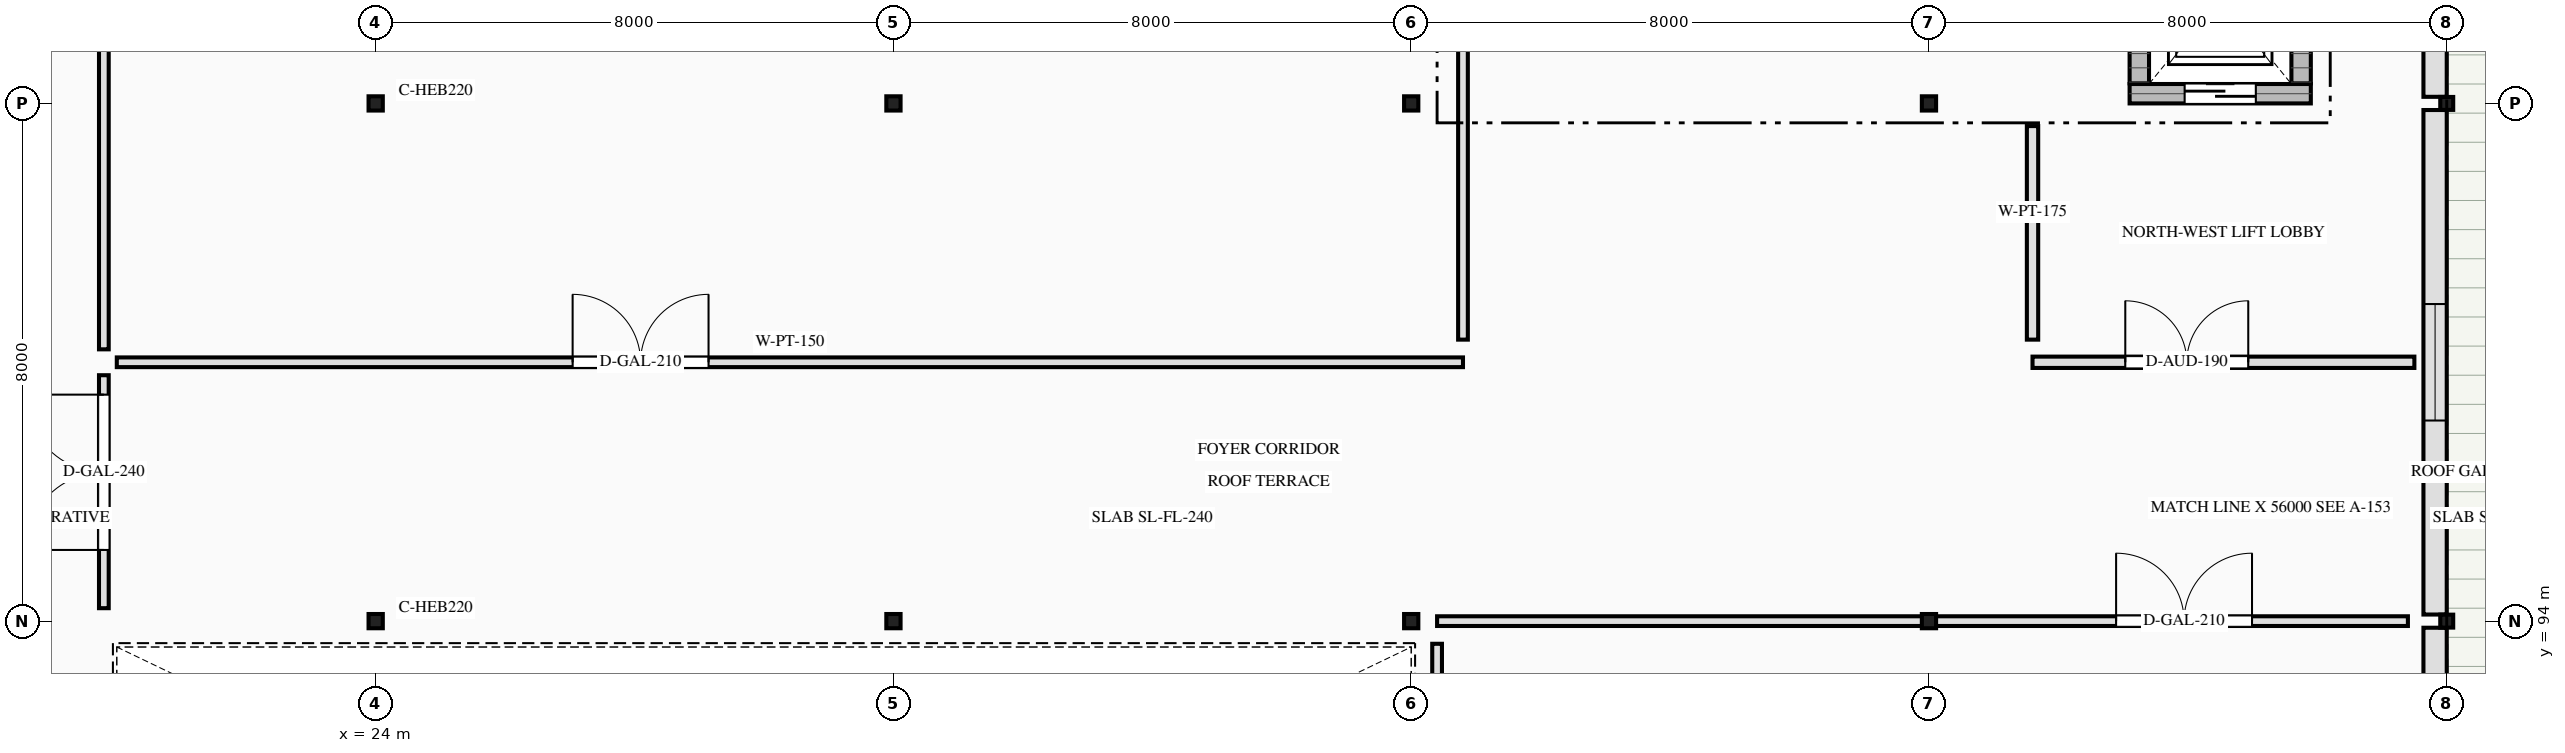
"""IFC4 building model, lengths in metres.
Left out: names, types, materials, properties, quantities, classifications, styles, units other than length and angle.
Written with IfcOpenShell. Run it as: python <this file> out.ifc"""

import sys

from ifc_helpers import new_model, si_unit, direction, frame, frame_2d, origin, origin_2d, place, context, subcontext, project, spatial, rectangle, i_section, extrude, element, fill, save


model = new_model("IFC4")
c1 = context("Model", 3, precision=1e-05, world=origin(), true_north=direction((0.0, 1.0)))
c2 = subcontext(c1, "Body", "Model", "MODEL_VIEW")
j1 = project(units=[si_unit("LENGTHUNIT", "METRE"), si_unit("PLANEANGLEUNIT", "RADIAN")], contexts=[c1])
p1 = place(None, origin())
s1 = spatial("IfcSite", under=j1, at=p1, CompositionType="ELEMENT")
p2 = place(p1, origin())
s2 = spatial("IfcBuilding", under=s1, at=p2, CompositionType="ELEMENT")
p3 = place(p2, frame((0.0, 0.0, 21.8)))
s3 = spatial("IfcBuildingStorey", under=s2, at=p3, CompositionType="ELEMENT", Elevation=21.8)
p4 = place(p3, frame((51.1, 102.15, 0.0), z_axis=(0.0, 0.0, 1.0), x_axis=(1.0, 0.0, 0.0)))
e1 = element("IfcWall", 1, at=p4, inside=s3, PredefinedType="SHEAR", context=c2, shape_type="SweptSolid", body=[
    extrude(rectangle(XDim=2.8, YDim=0.3, at=frame_2d((1.4, 0.0))), origin(), (0.0, 0.0, 1.0), 4.2),
])
p5 = place(p4, frame((0.85, 0.0, 0.0)))
e2 = element("IfcOpeningElement", 2, at=p5, cuts=e1, PredefinedType="OPENING", context=c2, shape_type="SweptSolid", body=[
    extrude(rectangle(XDim=1.1, YDim=2.15, at=frame_2d((0.55, 1.075))), frame((0.0, 0.16, 0.0), z_axis=(0.0, -1.0, 0.0), x_axis=(1.0, 0.0, 0.0)), (0.0, 0.0, 1.0), 0.32),
])
for number, where, z_axis, x_axis in (
    (3, (51.25, 102.31, 0.0), (0.0, 0.0, 1.0), (0.0, 1.0, 0.0)),
    (4, (53.75, 102.31, 0.0), (0.0, 0.0, 1.0), (0.0, 1.0, 0.0)),
):
    element("IfcWall", number, at=place(p3, frame(where, z_axis=z_axis, x_axis=x_axis)), inside=s3, PredefinedType="SHEAR", context=c2, shape_type="SweptSolid", body=[
        extrude(rectangle(XDim=2.68, YDim=0.3, at=frame_2d((1.34, 0.0))), origin(), (0.0, 0.0, 1.0), 4.2),
    ])
for number, where, z_axis, x_axis in (
    (5, (24.0, 94.0, 0.0), (0.0, 0.0, 1.0), (1.0, 0.0, 0.0)),
    (6, (24.0, 102.0, 0.0), (0.0, 0.0, 1.0), (1.0, 0.0, 0.0)),
    (7, (32.0, 94.0, 0.0), (0.0, 0.0, 1.0), (1.0, 0.0, 0.0)),
    (8, (32.0, 102.0, 0.0), (0.0, 0.0, 1.0), (1.0, 0.0, 0.0)),
    (9, (40.0, 94.0, 0.0), (0.0, 0.0, 1.0), (1.0, 0.0, 0.0)),
    (10, (40.0, 102.0, 0.0), (0.0, 0.0, 1.0), (1.0, 0.0, 0.0)),
    (11, (48.0, 94.0, 0.0), (0.0, 0.0, 1.0), (1.0, 0.0, 0.0)),
    (12, (48.0, 102.0, 0.0), (0.0, 0.0, 1.0), (1.0, 0.0, 0.0)),
):
    element("IfcColumn", number, at=place(p3, frame(where, z_axis=z_axis, x_axis=x_axis)), inside=s3, PredefinedType="COLUMN", context=c2, shape_type="SweptSolid", body=[
        extrude(i_section(OverallWidth=0.22, OverallDepth=0.22, WebThickness=0.01, FlangeThickness=0.016, FilletRadius=0.018, at=origin_2d()), origin(), (0.0, 0.0, 1.0), 4.2),
    ])
for number, where, z_axis, x_axis in (
    (13, (56.0, 94.0, 0.0), (0.0, 0.0, 1.0), (1.0, 0.0, 0.0)),
    (14, (56.0, 102.0, 0.0), (0.0, 0.0, 1.0), (1.0, 0.0, 0.0)),
):
    element("IfcColumn", number, at=place(p3, frame(where, z_axis=z_axis, x_axis=x_axis)), inside=s3, PredefinedType="COLUMN", context=c2, shape_type="SweptSolid", body=[
        extrude(i_section(OverallWidth=0.2, OverallDepth=0.2, WebThickness=0.009, FlangeThickness=0.015, FilletRadius=0.018, at=origin_2d()), origin(), (0.0, 0.0, 1.0), 4.2),
    ])
p6 = place(p3, frame((55.82, 93.898, 0.0), z_axis=(0.0, 0.0, 1.0), x_axis=(0.0, -1.0, 0.0)))
e15 = element("IfcWall", 15, at=p6, inside=s3, PredefinedType="ELEMENTEDWALL", context=c2, shape_type="SweptSolid", body=[
    extrude(rectangle(XDim=7.796, YDim=0.36, at=frame_2d((3.898, 0.0))), origin(), (0.0, 0.0, 1.0), 3.92),
])
p7 = place(p6, frame((2.923, 0.0, 0.0)))
e16 = element("IfcOpeningElement", 16, at=p7, cuts=e15, PredefinedType="OPENING", context=c2, shape_type="SweptSolid", body=[
    extrude(rectangle(XDim=1.95, YDim=2.35, at=frame_2d((0.975, 1.175))), frame((0.0, 0.19, 0.0), z_axis=(0.0, -1.0, 0.0), x_axis=(1.0, 0.0, 0.0)), (0.0, 0.0, 1.0), 0.38),
])
p8 = place(p3, frame((55.82, 101.898, 0.0), z_axis=(0.0, 0.0, 1.0), x_axis=(0.0, -1.0, 0.0)))
e17 = element("IfcWall", 17, at=p8, inside=s3, PredefinedType="ELEMENTEDWALL", context=c2, shape_type="SweptSolid", body=[
    extrude(rectangle(XDim=7.796, YDim=0.36, at=frame_2d((3.898, 0.0))), origin(), (0.0, 0.0, 1.0), 3.92),
])
p9 = place(p8, frame((2.998, 0.0, 0.85)))
e18 = element("IfcOpeningElement", 18, at=p9, cuts=e17, PredefinedType="OPENING", context=c2, shape_type="SweptSolid", body=[
    extrude(rectangle(XDim=1.8, YDim=2.1, at=frame_2d((0.9, 1.05))), frame((0.0, 0.19, 0.0), z_axis=(0.0, -1.0, 0.0), x_axis=(1.0, 0.0, 0.0)), (0.0, 0.0, 1.0), 0.38),
])
p10 = place(p3, frame((55.82, 107.898, 0.0), z_axis=(0.0, 0.0, 1.0), x_axis=(0.0, -1.0, 0.0)))
e19 = element("IfcWall", 19, at=p10, inside=s3, PredefinedType="ELEMENTEDWALL", context=c2, shape_type="SweptSolid", body=[
    extrude(rectangle(XDim=5.796, YDim=0.36, at=frame_2d((2.898, 0.0))), origin(), (0.0, 0.0, 1.0), 3.92),
])
p11 = place(p10, frame((1.923, 0.0, 0.0)))
e20 = element("IfcOpeningElement", 20, at=p11, cuts=e19, PredefinedType="OPENING", context=c2, shape_type="SweptSolid", body=[
    extrude(rectangle(XDim=1.95, YDim=2.35, at=frame_2d((0.975, 1.175))), frame((0.0, 0.19, 0.0), z_axis=(0.0, -1.0, 0.0), x_axis=(1.0, 0.0, 0.0)), (0.0, 0.0, 1.0), 0.38),
])
p12 = place(p3, frame((49.6, 98.0, 0.0), z_axis=(0.0, 0.0, 1.0), x_axis=(1.0, 0.0, 0.0)))
e21 = element("IfcWall", 21, at=p12, inside=s3, PredefinedType="PARTITIONING", context=c2, shape_type="SweptSolid", body=[
    extrude(rectangle(XDim=5.9, YDim=0.175, at=frame_2d((2.95, 0.0))), origin(), (0.0, 0.0, 1.0), 3.92),
])
p13 = place(p12, frame((1.433, 0.0, 0.0)))
e22 = element("IfcOpeningElement", 22, at=p13, cuts=e21, PredefinedType="OPENING", context=c2, shape_type="SweptSolid", body=[
    extrude(rectangle(XDim=1.9, YDim=2.35, at=frame_2d((0.95, 1.175))), frame((0.0, 0.097, 0.0), z_axis=(0.0, -1.0, 0.0), x_axis=(1.0, 0.0, 0.0)), (0.0, 0.0, 1.0), 0.195),
])
p14 = place(p3, frame((19.8, 94.2, 0.0), z_axis=(0.0, 0.0, 1.0), x_axis=(0.0, 1.0, 0.0)))
e23 = element("IfcWall", 23, at=p14, inside=s3, PredefinedType="PARTITIONING", context=c2, shape_type="SweptSolid", body=[
    extrude(rectangle(XDim=3.6, YDim=0.15, at=frame_2d((1.8, 0.0))), origin(), (0.0, 0.0, 1.0), 3.92),
])
p15 = place(p14, frame((0.9, 0.0, 0.0)))
e24 = element("IfcOpeningElement", 24, at=p15, cuts=e23, PredefinedType="OPENING", context=c2, shape_type="SweptSolid", body=[
    extrude(rectangle(XDim=2.4, YDim=2.75, at=frame_2d((1.2, 1.375))), frame((0.0, 0.085, 0.0), z_axis=(0.0, -1.0, 0.0), x_axis=(1.0, 0.0, 0.0)), (0.0, 0.0, 1.0), 0.17),
])
p16 = place(p3, frame((20.0, 98.0, 0.0), z_axis=(0.0, 0.0, 1.0), x_axis=(1.0, 0.0, 0.0)))
e25 = element("IfcWall", 25, at=p16, inside=s3, PredefinedType="PARTITIONING", context=c2, shape_type="SweptSolid", body=[
    extrude(rectangle(XDim=20.8, YDim=0.15, at=frame_2d((10.4, 0.0))), origin(), (0.0, 0.0, 1.0), 3.92),
])
p17 = place(p16, frame((7.043, 0.0, 0.0)))
e26 = element("IfcOpeningElement", 26, at=p17, cuts=e25, PredefinedType="OPENING", context=c2, shape_type="SweptSolid", body=[
    extrude(rectangle(XDim=2.1, YDim=2.6, at=frame_2d((1.05, 1.3))), frame((0.0, 0.085, 0.0), z_axis=(0.0, -1.0, 0.0), x_axis=(1.0, 0.0, 0.0)), (0.0, 0.0, 1.0), 0.17),
])
p18 = place(p3, frame((40.4, 94.0, 0.0), z_axis=(0.0, 0.0, 1.0), x_axis=(1.0, 0.0, 0.0)))
e27 = element("IfcWall", 27, at=p18, inside=s3, PredefinedType="PARTITIONING", context=c2, shape_type="SweptSolid", body=[
    extrude(rectangle(XDim=15.0, YDim=0.15, at=frame_2d((7.5, 0.0))), origin(), (0.0, 0.0, 1.0), 3.92),
])
p19 = place(p18, frame((10.491, 0.0, 0.0)))
e28 = element("IfcOpeningElement", 28, at=p19, cuts=e27, PredefinedType="OPENING", context=c2, shape_type="SweptSolid", body=[
    extrude(rectangle(XDim=2.1, YDim=2.6, at=frame_2d((1.05, 1.3))), frame((0.0, 0.085, 0.0), z_axis=(0.0, -1.0, 0.0), x_axis=(1.0, 0.0, 0.0)), (0.0, 0.0, 1.0), 0.17),
])
p20 = place(p3, frame((19.8, 98.2, 0.0), z_axis=(0.0, 0.0, 1.0), x_axis=(0.0, 1.0, 0.0)))
e29 = element("IfcWall", 29, at=p20, inside=s3, PredefinedType="PARTITIONING", context=c2, shape_type="SweptSolid", body=[
    extrude(rectangle(XDim=15.0, YDim=0.15, at=frame_2d((7.5, 0.0))), origin(), (0.0, 0.0, 1.0), 3.92),
])
p21 = place(p20, frame((5.594, 0.0, 0.0)))
e30 = element("IfcOpeningElement", 30, at=p21, cuts=e29, PredefinedType="OPENING", context=c2, shape_type="SweptSolid", body=[
    extrude(rectangle(XDim=2.4, YDim=2.75, at=frame_2d((1.2, 1.375))), frame((0.0, 0.085, 0.0), z_axis=(0.0, -1.0, 0.0), x_axis=(1.0, 0.0, 0.0)), (0.0, 0.0, 1.0), 0.17),
])
p22 = place(p3, frame((49.6, 98.35, 0.0), z_axis=(0.0, 0.0, 1.0), x_axis=(0.0, 1.0, 0.0)))
e31 = element("IfcWall", 31, at=p22, inside=s3, PredefinedType="PARTITIONING", context=c2, shape_type="SweptSolid", body=[
    extrude(rectangle(XDim=3.3, YDim=0.175, at=frame_2d((1.65, 0.0))), origin(), (0.0, 0.0, 1.0), 3.92),
])
for number, where, z_axis, x_axis in (
    (32, (40.8, 98.35, 0.0), (0.0, 0.0, 1.0), (0.0, 1.0, 0.0)),
    (33, (40.4, 78.95, 0.0), (0.0, 0.0, 1.0), (0.0, 1.0, 0.0)),
):
    element("IfcWall", number, at=place(p3, frame(where, z_axis=z_axis, x_axis=x_axis)), inside=s3, PredefinedType="PARTITIONING", context=c2, shape_type="SweptSolid", body=[
        extrude(rectangle(XDim=14.7, YDim=0.15, at=frame_2d((7.35, 0.0))), origin(), (0.0, 0.0, 1.0), 3.92),
    ])
p23 = place(p9, origin())
e34 = element("IfcWindow", 34, at=p23, inside=s3, PartitioningType="DOUBLE_PANEL_VERTICAL", PredefinedType="WINDOW", context=c2, shape_type="SweptSolid", body=[
    extrude(rectangle(XDim=1.8, YDim=2.1, at=frame_2d((0.9, 1.05))), frame((0.0, 0.03, 0.0), z_axis=(0.0, -1.0, 0.0), x_axis=(1.0, 0.0, 0.0)), (0.0, 0.0, 1.0), 0.06),
])
fill(e18, e34)
p24 = place(p5, origin())
e35 = element("IfcDoor", 35, at=p24, inside=s3, OperationType="SLIDING_TO_LEFT", PredefinedType="DOOR", context=c2, shape_type="SweptSolid", body=[
    extrude(rectangle(XDim=1.1, YDim=2.15, at=frame_2d((0.55, 1.075))), frame((0.0, 0.025, 0.0), z_axis=(0.0, -1.0, 0.0), x_axis=(1.0, 0.0, 0.0)), (0.0, 0.0, 1.0), 0.05),
])
fill(e2, e35)
p25 = place(p13, origin())
e36 = element("IfcDoor", 36, at=p25, inside=s3, OperationType="DOUBLE_DOOR_SINGLE_SWING", PredefinedType="DOOR", context=c2, shape_type="SweptSolid", body=[
    extrude(rectangle(XDim=1.9, YDim=2.35, at=frame_2d((0.95, 1.175))), frame((0.0, 0.025, 0.0), z_axis=(0.0, -1.0, 0.0), x_axis=(1.0, 0.0, 0.0)), (0.0, 0.0, 1.0), 0.05),
])
fill(e22, e36)
p26 = place(p15, origin())
e37 = element("IfcDoor", 37, at=p26, inside=s3, OperationType="DOUBLE_DOOR_DOUBLE_SWING", PredefinedType="DOOR", context=c2, shape_type="SweptSolid", body=[
    extrude(rectangle(XDim=2.4, YDim=2.75, at=frame_2d((1.2, 1.375))), frame((0.0, 0.025, 0.0), z_axis=(0.0, -1.0, 0.0), x_axis=(1.0, 0.0, 0.0)), (0.0, 0.0, 1.0), 0.05),
])
fill(e24, e37)
p27 = place(p17, origin())
e38 = element("IfcDoor", 38, at=p27, inside=s3, OperationType="DOUBLE_DOOR_SINGLE_SWING", PredefinedType="DOOR", context=c2, shape_type="SweptSolid", body=[
    extrude(rectangle(XDim=2.1, YDim=2.6, at=frame_2d((1.05, 1.3))), frame((0.0, 0.025, 0.0), z_axis=(0.0, -1.0, 0.0), x_axis=(1.0, 0.0, 0.0)), (0.0, 0.0, 1.0), 0.05),
])
fill(e26, e38)
p28 = place(p19, origin())
e39 = element("IfcDoor", 39, at=p28, inside=s3, OperationType="DOUBLE_DOOR_SINGLE_SWING", PredefinedType="DOOR", context=c2, shape_type="SweptSolid", body=[
    extrude(rectangle(XDim=2.1, YDim=2.6, at=frame_2d((1.05, 1.3))), frame((0.0, 0.025, 0.0), z_axis=(0.0, -1.0, 0.0), x_axis=(1.0, 0.0, 0.0)), (0.0, 0.0, 1.0), 0.05),
])
fill(e28, e39)
save(model, sys.argv[1])
